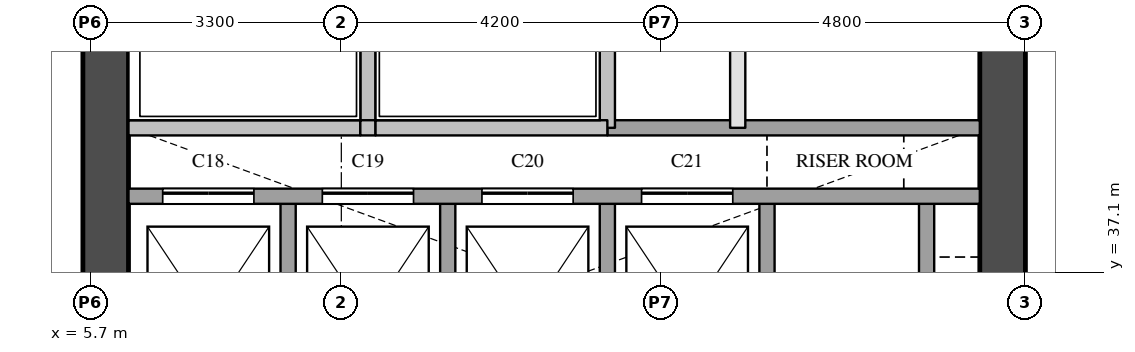
"""IFC4 building model, lengths in metres.
Left out: names, types, materials, properties, quantities, classifications, styles, units other than length and angle.
Written with IfcOpenShell. Run it as: python <this file> out.ifc"""

import sys

from ifc_helpers import new_model, si_unit, direction, frame, frame_2d, origin, place, context, subcontext, project, spatial, rectangle, extrude, element, fill, save


model = new_model("IFC4")
c1 = context("Model", 3, precision=1e-05, world=origin(), true_north=direction((0.0, 1.0)))
c2 = subcontext(c1, "Body", "Model", "MODEL_VIEW")
j1 = project(units=[si_unit("LENGTHUNIT", "METRE"), si_unit("PLANEANGLEUNIT", "RADIAN")], contexts=[c1])
p1 = place(None, origin())
s1 = spatial("IfcSite", under=j1, at=p1, CompositionType="ELEMENT")
p2 = place(p1, origin())
s2 = spatial("IfcBuilding", under=s1, at=p2, CompositionType="ELEMENT")
p3 = place(p2, frame((0.0, 0.0, 50.0)))
s3 = spatial("IfcBuildingStorey", under=s2, at=p3, CompositionType="ELEMENT", Elevation=50.0)
p4 = place(p3, frame((5.9, 29.1, 0.0), z_axis=(0.0, 0.0, 1.0), x_axis=(0.0, 1.0, 0.0)))
e1 = element("IfcWall", 1, at=p4, inside=s3, PredefinedType="SHEAR", context=c2, shape_type="SweptSolid", body=[
    extrude(rectangle(XDim=20.3, YDim=0.6, at=frame_2d((10.15, 0.0))), origin(), (0.0, 0.0, 1.0), 3.5),
])
p5 = place(p4, frame((3.6, 0.0, 0.0)))
e2 = element("IfcOpeningElement", 2, at=p5, cuts=e1, PredefinedType="OPENING", context=c2, shape_type="SweptSolid", body=[
    extrude(rectangle(XDim=1.8, YDim=2.1, at=frame_2d((0.9, 1.05))), frame((0.0, 0.31, 0.0), z_axis=(0.0, -1.0, 0.0), x_axis=(1.0, 0.0, 0.0)), (0.0, 0.0, 1.0), 0.62),
])
p6 = place(p4, frame((16.4, 0.0, 0.0)))
e3 = element("IfcOpeningElement", 3, at=p6, cuts=e1, PredefinedType="OPENING", context=c2, shape_type="SweptSolid", body=[
    extrude(rectangle(XDim=1.0, YDim=2.1, at=frame_2d((0.5, 1.05))), frame((0.0, 0.31, 0.0), z_axis=(0.0, -1.0, 0.0), x_axis=(1.0, 0.0, 0.0)), (0.0, 0.0, 1.0), 0.62),
])
p7 = place(p3, frame((17.7, 29.1, 0.0), z_axis=(0.0, 0.0, 1.0), x_axis=(0.0, 1.0, 0.0)))
e4 = element("IfcWall", 4, at=p7, inside=s3, PredefinedType="SHEAR", context=c2, shape_type="SweptSolid", body=[
    extrude(rectangle(XDim=20.3, YDim=0.6, at=frame_2d((10.15, 0.0))), origin(), (0.0, 0.0, 1.0), 3.5),
])
p8 = place(p7, frame((1.25, 0.0, 0.0)))
e5 = element("IfcOpeningElement", 5, at=p8, cuts=e4, PredefinedType="OPENING", context=c2, shape_type="SweptSolid", body=[
    extrude(rectangle(XDim=0.7, YDim=2.1, at=frame_2d((0.35, 1.05))), frame((0.0, 0.31, 0.0), z_axis=(0.0, -1.0, 0.0), x_axis=(1.0, 0.0, 0.0)), (0.0, 0.0, 1.0), 0.62),
])
p9 = place(p7, frame((7.05, 0.0, 0.0)))
e6 = element("IfcOpeningElement", 6, at=p9, cuts=e4, PredefinedType="OPENING", context=c2, shape_type="SweptSolid", body=[
    extrude(rectangle(XDim=0.7, YDim=2.1, at=frame_2d((0.35, 1.05))), frame((0.0, 0.31, 0.0), z_axis=(0.0, -1.0, 0.0), x_axis=(1.0, 0.0, 0.0)), (0.0, 0.0, 1.0), 0.62),
])
p10 = place(p3, frame((8.3, 34.9, 0.0), z_axis=(0.0, 0.0, 1.0), x_axis=(0.0, 1.0, 0.0)))
e7 = element("IfcWall", 7, at=p10, inside=s3, PredefinedType="SOLIDWALL", context=c2, shape_type="SweptSolid", body=[
    extrude(rectangle(XDim=3.2, YDim=0.2, at=frame_2d((1.6, 0.0))), origin(), (0.0, 0.0, 1.0), 3.5),
])
p11 = place(p3, frame((9.35, 39.0, 0.0), z_axis=(0.0, 0.0, 1.0), x_axis=(0.0, 1.0, 0.0)))
e8 = element("IfcWall", 8, at=p11, inside=s3, PredefinedType="SOLIDWALL", context=c2, shape_type="SweptSolid", body=[
    extrude(rectangle(XDim=1.9, YDim=0.2, at=frame_2d((0.95, 0.0))), origin(), (0.0, 0.0, 1.0), 3.5),
])
for number, where, z_axis, x_axis in (
    (9, (10.4, 34.9, 0.0), (0.0, 0.0, 1.0), (0.0, 1.0, 0.0)),
    (10, (12.5, 34.9, 0.0), (0.0, 0.0, 1.0), (0.0, 1.0, 0.0)),
):
    element("IfcWall", number, at=place(p3, frame(where, z_axis=z_axis, x_axis=x_axis)), inside=s3, PredefinedType="SOLIDWALL", context=c2, shape_type="SweptSolid", body=[
        extrude(rectangle(XDim=3.2, YDim=0.2, at=frame_2d((1.6, 0.0))), origin(), (0.0, 0.0, 1.0), 3.5),
    ])
p12 = place(p3, frame((12.5, 39.0, 0.0), z_axis=(0.0, 0.0, 1.0), x_axis=(0.0, 1.0, 0.0)))
e11 = element("IfcWall", 11, at=p12, inside=s3, PredefinedType="SOLIDWALL", context=c2, shape_type="SweptSolid", body=[
    extrude(rectangle(XDim=1.9, YDim=0.2, at=frame_2d((0.95, 0.0))), origin(), (0.0, 0.0, 1.0), 3.5),
])
p13 = place(p3, frame((14.215, 39.0, 0.0), z_axis=(0.0, 0.0, 1.0), x_axis=(0.0, 1.0, 0.0)))
e12 = element("IfcWall", 12, at=p13, inside=s3, PredefinedType="PARTITIONING", context=c2, shape_type="SweptSolid", body=[
    extrude(rectangle(XDim=6.2, YDim=0.2, at=frame_2d((3.1, 0.0))), origin(), (0.0, 0.0, 1.0), 3.5),
])
for number, where, z_axis, x_axis in (
    (13, (14.6, 34.9, 0.0), (0.0, 0.0, 1.0), (0.0, 1.0, 0.0)),
    (14, (16.7, 34.9, 0.0), (0.0, 0.0, 1.0), (0.0, 1.0, 0.0)),
):
    element("IfcWall", number, at=place(p3, frame(where, z_axis=z_axis, x_axis=x_axis)), inside=s3, PredefinedType="SOLIDWALL", context=c2, shape_type="SweptSolid", body=[
        extrude(rectangle(XDim=3.2, YDim=0.2, at=frame_2d((1.6, 0.0))), origin(), (0.0, 0.0, 1.0), 3.5),
    ])
p14 = place(p3, frame((6.2, 38.1, 0.0), z_axis=(0.0, 0.0, 1.0), x_axis=(1.0, 0.0, 0.0)))
e15 = element("IfcWall", 15, at=p14, inside=s3, PredefinedType="SOLIDWALL", context=c2, shape_type="SweptSolid", body=[
    extrude(rectangle(XDim=11.2, YDim=0.2, at=frame_2d((5.6, 0.0))), origin(), (0.0, 0.0, 1.0), 3.5),
])
p15 = place(p14, frame((0.45, 0.0, 0.0)))
e16 = element("IfcOpeningElement", 16, at=p15, cuts=e15, PredefinedType="OPENING", context=c2, shape_type="SweptSolid", body=[
    extrude(rectangle(XDim=1.2, YDim=2.1, at=frame_2d((0.6, 1.05))), frame((0.0, 0.11, 0.0), z_axis=(0.0, -1.0, 0.0), x_axis=(1.0, 0.0, 0.0)), (0.0, 0.0, 1.0), 0.22),
])
p16 = place(p14, frame((2.55, 0.0, 0.0)))
e17 = element("IfcOpeningElement", 17, at=p16, cuts=e15, PredefinedType="OPENING", context=c2, shape_type="SweptSolid", body=[
    extrude(rectangle(XDim=1.2, YDim=2.1, at=frame_2d((0.6, 1.05))), frame((0.0, 0.11, 0.0), z_axis=(0.0, -1.0, 0.0), x_axis=(1.0, 0.0, 0.0)), (0.0, 0.0, 1.0), 0.22),
])
p17 = place(p14, frame((4.65, 0.0, 0.0)))
e18 = element("IfcOpeningElement", 18, at=p17, cuts=e15, PredefinedType="OPENING", context=c2, shape_type="SweptSolid", body=[
    extrude(rectangle(XDim=1.2, YDim=2.1, at=frame_2d((0.6, 1.05))), frame((0.0, 0.11, 0.0), z_axis=(0.0, -1.0, 0.0), x_axis=(1.0, 0.0, 0.0)), (0.0, 0.0, 1.0), 0.22),
])
p18 = place(p14, frame((6.75, 0.0, 0.0)))
e19 = element("IfcOpeningElement", 19, at=p18, cuts=e15, PredefinedType="OPENING", context=c2, shape_type="SweptSolid", body=[
    extrude(rectangle(XDim=1.2, YDim=2.1, at=frame_2d((0.6, 1.05))), frame((0.0, 0.11, 0.0), z_axis=(0.0, -1.0, 0.0), x_axis=(1.0, 0.0, 0.0)), (0.0, 0.0, 1.0), 0.22),
])
p19 = place(p3, frame((12.5, 39.0, 0.0), z_axis=(0.0, 0.0, 1.0), x_axis=(1.0, 0.0, 0.0)))
e20 = element("IfcWall", 20, at=p19, inside=s3, PredefinedType="SOLIDWALL", context=c2, shape_type="SweptSolid", body=[
    extrude(rectangle(XDim=4.9, YDim=0.2, at=frame_2d((2.45, 0.0))), origin(), (0.0, 0.0, 1.0), 3.5),
])
p20 = place(p3, frame((6.2, 39.0, 0.0), z_axis=(0.0, 0.0, 1.0), x_axis=(1.0, 0.0, 0.0)))
e21 = element("IfcWall", 21, at=p20, inside=s3, PredefinedType="SOLIDWALL", context=c2, shape_type="SweptSolid", body=[
    extrude(rectangle(XDim=3.05, YDim=0.2, at=frame_2d((1.525, 0.0))), origin(), (0.0, 0.0, 1.0), 3.5),
])
p21 = place(p3, frame((9.25, 39.0, 0.0), z_axis=(0.0, 0.0, 1.0), x_axis=(1.0, 0.0, 0.0)))
e22 = element("IfcWall", 22, at=p21, inside=s3, PredefinedType="SOLIDWALL", context=c2, shape_type="SweptSolid", body=[
    extrude(rectangle(XDim=0.2, YDim=0.2, at=frame_2d((0.1, 0.0))), origin(), (0.0, 0.0, 1.0), 3.5),
])
p22 = place(p3, frame((9.45, 39.0, 0.0), z_axis=(0.0, 0.0, 1.0), x_axis=(1.0, 0.0, 0.0)))
e23 = element("IfcWall", 23, at=p22, inside=s3, PredefinedType="SOLIDWALL", context=c2, shape_type="SweptSolid", body=[
    extrude(rectangle(XDim=3.05, YDim=0.2, at=frame_2d((1.525, 0.0))), origin(), (0.0, 0.0, 1.0), 3.5),
])
p23 = place(p15, origin())
e24 = element("IfcDoor", 24, at=p23, inside=s3, OperationType="SLIDING_TO_LEFT", PredefinedType="DOOR", context=c2, shape_type="SweptSolid", body=[
    extrude(rectangle(XDim=1.2, YDim=2.1, at=frame_2d((0.6, 1.05))), frame((0.0, 0.025, 0.0), z_axis=(0.0, -1.0, 0.0), x_axis=(1.0, 0.0, 0.0)), (0.0, 0.0, 1.0), 0.05),
])
fill(e16, e24)
p24 = place(p16, origin())
e25 = element("IfcDoor", 25, at=p24, inside=s3, OperationType="SLIDING_TO_LEFT", PredefinedType="DOOR", context=c2, shape_type="SweptSolid", body=[
    extrude(rectangle(XDim=1.2, YDim=2.1, at=frame_2d((0.6, 1.05))), frame((0.0, 0.025, 0.0), z_axis=(0.0, -1.0, 0.0), x_axis=(1.0, 0.0, 0.0)), (0.0, 0.0, 1.0), 0.05),
])
fill(e17, e25)
p25 = place(p17, origin())
e26 = element("IfcDoor", 26, at=p25, inside=s3, OperationType="SLIDING_TO_LEFT", PredefinedType="DOOR", context=c2, shape_type="SweptSolid", body=[
    extrude(rectangle(XDim=1.2, YDim=2.1, at=frame_2d((0.6, 1.05))), frame((0.0, 0.025, 0.0), z_axis=(0.0, -1.0, 0.0), x_axis=(1.0, 0.0, 0.0)), (0.0, 0.0, 1.0), 0.05),
])
fill(e18, e26)
p26 = place(p18, origin())
e27 = element("IfcDoor", 27, at=p26, inside=s3, OperationType="SLIDING_TO_LEFT", PredefinedType="DOOR", context=c2, shape_type="SweptSolid", body=[
    extrude(rectangle(XDim=1.2, YDim=2.1, at=frame_2d((0.6, 1.05))), frame((0.0, 0.025, 0.0), z_axis=(0.0, -1.0, 0.0), x_axis=(1.0, 0.0, 0.0)), (0.0, 0.0, 1.0), 0.05),
])
fill(e19, e27)
save(model, sys.argv[1])
